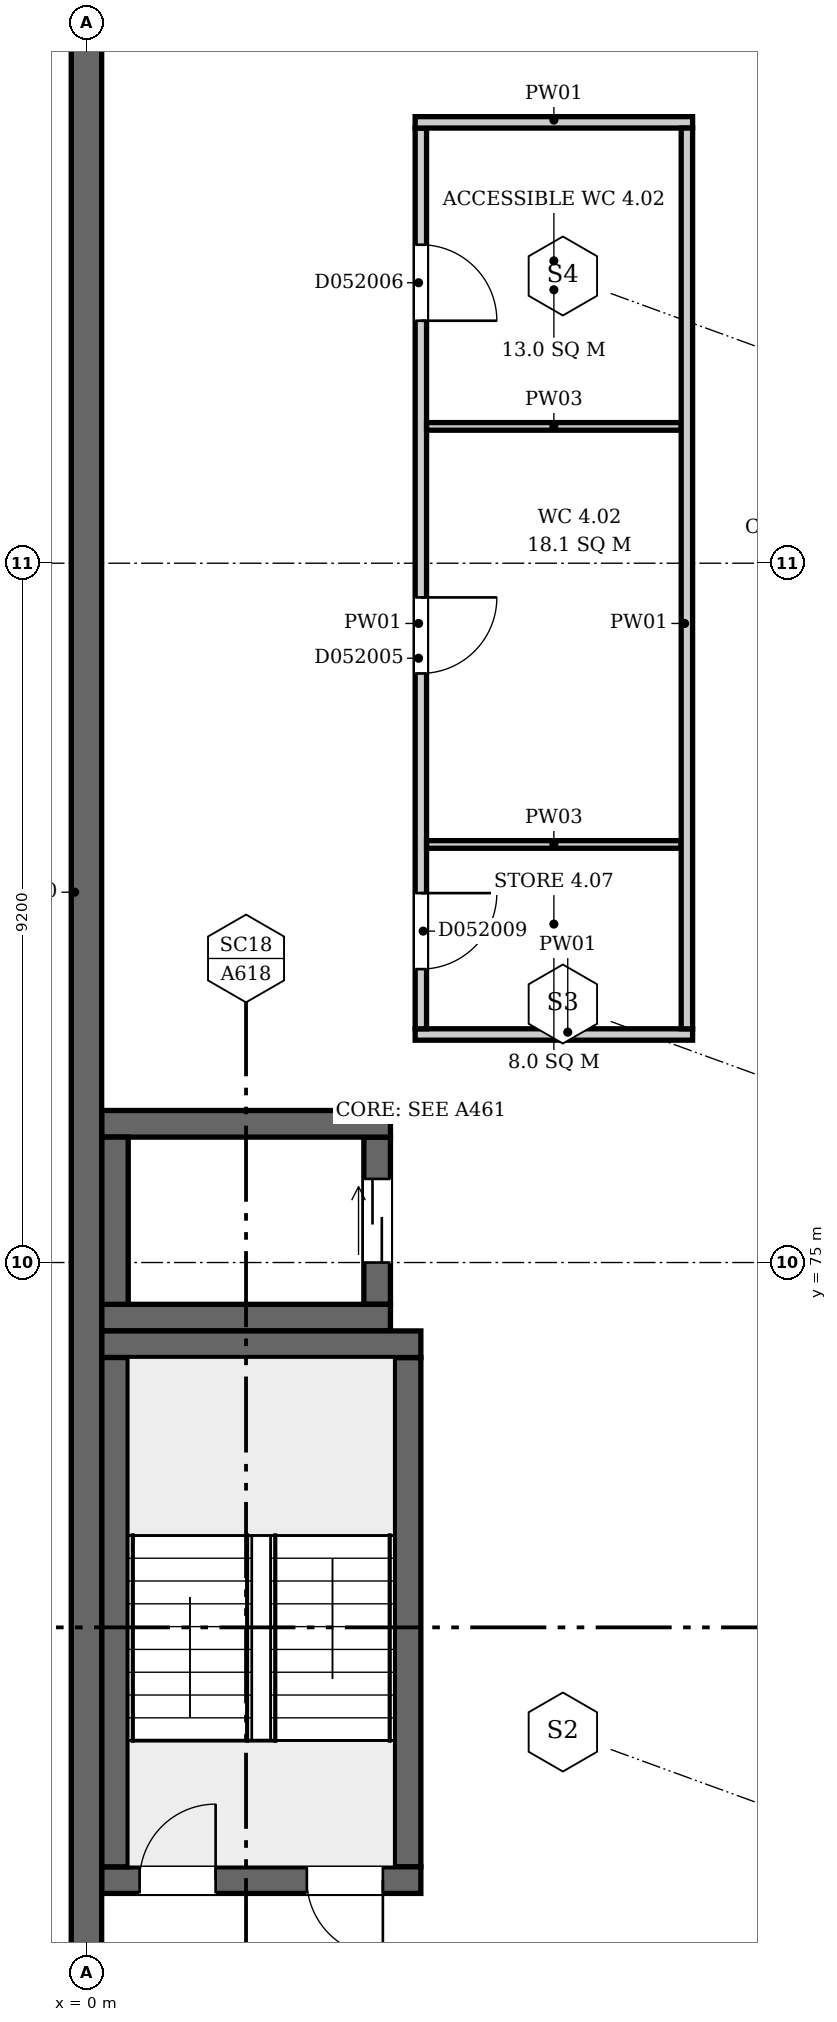
"""IFC4 building model, lengths in metres.
Left out: names, types, materials, properties, quantities, classifications, styles, units other than length and angle.
Written with IfcOpenShell. Run it as: python <this file> out.ifc"""

import sys

from ifc_helpers import new_model, si_unit, direction, frame, frame_2d, origin, place, context, subcontext, project, spatial, rectangle, extrude, element, fill, save


model = new_model("IFC4")
c1 = context("Model", 3, precision=1e-05, world=origin(), true_north=direction((0.0, 1.0)))
c2 = subcontext(c1, "Body", "Model", "MODEL_VIEW")
j1 = project(units=[si_unit("LENGTHUNIT", "METRE"), si_unit("PLANEANGLEUNIT", "RADIAN")], contexts=[c1])
p1 = place(None, origin())
s1 = spatial("IfcSite", under=j1, at=p1, CompositionType="ELEMENT")
p2 = place(p1, origin())
s2 = spatial("IfcBuilding", under=s1, at=p2, CompositionType="ELEMENT")
p3 = place(p2, frame((0.0, 0.0, 26.7)))
s3 = spatial("IfcBuildingStorey", under=s2, at=p3, CompositionType="ELEMENT", Elevation=26.7)
p4 = place(p3, frame((0.0, 46.72, 0.0), z_axis=(0.0, 0.0, 1.0), x_axis=(0.0, 1.0, 0.0)))
e1 = element("IfcWall", 1, at=p4, inside=s3, PredefinedType="SHEAR", context=c2, shape_type="SweptSolid", body=[
    extrude(rectangle(XDim=47.36, YDim=0.4, at=frame_2d((23.68, 0.0))), origin(), (0.0, 0.0, 1.0), 5.2),
])
p5 = place(p3, frame((0.2, 66.875, 0.0), z_axis=(0.0, 0.0, 1.0), x_axis=(1.0, 0.0, 0.0)))
e2 = element("IfcWall", 2, at=p5, inside=s3, PredefinedType="SHEAR", context=c2, shape_type="SweptSolid", body=[
    extrude(rectangle(XDim=4.2, YDim=0.35, at=frame_2d((2.1, 0.0))), origin(), (0.0, 0.0, 1.0), 5.2),
])
p6 = place(p5, frame((0.5, 0.0, 0.0)))
e3 = element("IfcOpeningElement", 3, at=p6, cuts=e2, PredefinedType="OPENING", context=c2, shape_type="SweptSolid", body=[
    extrude(rectangle(XDim=1.0, YDim=2.1, at=frame_2d((0.5, 1.05))), frame((0.0, 0.185, 0.0), z_axis=(0.0, -1.0, 0.0), x_axis=(1.0, 0.0, 0.0)), (0.0, 0.0, 1.0), 0.37),
])
p7 = place(p5, frame((2.7, 0.0, 0.0)))
e4 = element("IfcOpeningElement", 4, at=p7, cuts=e2, PredefinedType="OPENING", context=c2, shape_type="SweptSolid", body=[
    extrude(rectangle(XDim=1.0, YDim=2.1, at=frame_2d((0.5, 1.05))), frame((0.0, 0.185, 0.0), z_axis=(0.0, -1.0, 0.0), x_axis=(1.0, 0.0, 0.0)), (0.0, 0.0, 1.0), 0.37),
])
p8 = place(p3, frame((0.2, 73.925, 0.0), z_axis=(0.0, 0.0, 1.0), x_axis=(1.0, 0.0, 0.0)))
e5 = element("IfcWall", 5, at=p8, inside=s3, PredefinedType="SHEAR", context=c2, shape_type="SweptSolid", body=[
    extrude(rectangle(XDim=4.2, YDim=0.35, at=frame_2d((2.1, 0.0))), origin(), (0.0, 0.0, 1.0), 5.2),
])
for number, where, z_axis, x_axis in (
    (6, (0.375, 67.05, 0.0), (0.0, 0.0, 1.0), (0.0, 1.0, 0.0)),
    (7, (4.225, 67.05, 0.0), (0.0, 0.0, 1.0), (0.0, 1.0, 0.0)),
):
    element("IfcWall", number, at=place(p3, frame(where, z_axis=z_axis, x_axis=x_axis)), inside=s3, PredefinedType="SHEAR", context=c2, shape_type="SweptSolid", body=[
        extrude(rectangle(XDim=6.7, YDim=0.35, at=frame_2d((3.35, 0.0))), origin(), (0.0, 0.0, 1.0), 5.2),
    ])
for number, where, z_axis, x_axis in (
    (8, (0.2, 74.275, 0.0), (0.0, 0.0, 1.0), (1.0, 0.0, 0.0)),
    (9, (0.2, 76.825, 0.0), (0.0, 0.0, 1.0), (1.0, 0.0, 0.0)),
):
    element("IfcWall", number, at=place(p3, frame(where, z_axis=z_axis, x_axis=x_axis)), inside=s3, PredefinedType="SHEAR", context=c2, shape_type="SweptSolid", body=[
        extrude(rectangle(XDim=3.8, YDim=0.35, at=frame_2d((1.9, 0.0))), origin(), (0.0, 0.0, 1.0), 5.2),
    ])
p9 = place(p3, frame((0.375, 74.45, 0.0), z_axis=(0.0, 0.0, 1.0), x_axis=(0.0, 1.0, 0.0)))
e10 = element("IfcWall", 10, at=p9, inside=s3, PredefinedType="SHEAR", context=c2, shape_type="SweptSolid", body=[
    extrude(rectangle(XDim=2.2, YDim=0.35, at=frame_2d((1.1, 0.0))), origin(), (0.0, 0.0, 1.0), 5.2),
])
p10 = place(p3, frame((3.825, 74.45, 0.0), z_axis=(0.0, 0.0, 1.0), x_axis=(0.0, 1.0, 0.0)))
e11 = element("IfcWall", 11, at=p10, inside=s3, PredefinedType="SHEAR", context=c2, shape_type="SweptSolid", body=[
    extrude(rectangle(XDim=2.2, YDim=0.35, at=frame_2d((1.1, 0.0))), origin(), (0.0, 0.0, 1.0), 5.2),
])
p11 = place(p10, frame((0.55, 0.0, 0.0)))
e12 = element("IfcOpeningElement", 12, at=p11, cuts=e11, PredefinedType="OPENING", context=c2, shape_type="SweptSolid", body=[
    extrude(rectangle(XDim=1.1, YDim=2.1, at=frame_2d((0.55, 1.05))), frame((0.0, 0.185, 0.0), z_axis=(0.0, -1.0, 0.0), x_axis=(1.0, 0.0, 0.0)), (0.0, 0.0, 1.0), 0.37),
])
p12 = place(p3, frame((4.325, 78.0, 0.0), z_axis=(0.0, 0.0, 1.0), x_axis=(1.0, 0.0, 0.0)))
e13 = element("IfcWall", 13, at=p12, inside=s3, PredefinedType="PARTITIONING", context=c2, shape_type="SweptSolid", body=[
    extrude(rectangle(XDim=3.65, YDim=0.15, at=frame_2d((1.825, 0.0))), origin(), (0.0, 0.0, 1.0), 4.85),
])
p13 = place(p3, frame((4.4, 78.075, 0.0), z_axis=(0.0, 0.0, 1.0), x_axis=(0.0, 1.0, 0.0)))
e14 = element("IfcWall", 14, at=p13, inside=s3, PredefinedType="PARTITIONING", context=c2, shape_type="SweptSolid", body=[
    extrude(rectangle(XDim=11.85, YDim=0.15, at=frame_2d((5.925, 0.0))), origin(), (0.0, 0.0, 1.0), 4.85),
])
p14 = place(p13, frame((4.675, 0.0, 0.0)))
e15 = element("IfcOpeningElement", 15, at=p14, cuts=e14, PredefinedType="OPENING", context=c2, shape_type="SweptSolid", body=[
    extrude(rectangle(XDim=1.0, YDim=2.1, at=frame_2d((0.5, 1.05))), frame((0.0, 0.085, 0.0), z_axis=(0.0, -1.0, 0.0), x_axis=(1.0, 0.0, 0.0)), (0.0, 0.0, 1.0), 0.17),
])
p15 = place(p13, frame((9.315, 0.0, 0.0)))
e16 = element("IfcOpeningElement", 16, at=p15, cuts=e14, PredefinedType="OPENING", context=c2, shape_type="SweptSolid", body=[
    extrude(rectangle(XDim=1.0, YDim=2.1, at=frame_2d((0.5, 1.05))), frame((0.0, 0.085, 0.0), z_axis=(0.0, -1.0, 0.0), x_axis=(1.0, 0.0, 0.0)), (0.0, 0.0, 1.0), 0.17),
])
p16 = place(p13, frame((0.785, 0.0, 0.0)))
e17 = element("IfcOpeningElement", 17, at=p16, cuts=e14, PredefinedType="OPENING", context=c2, shape_type="SweptSolid", body=[
    extrude(rectangle(XDim=1.0, YDim=2.1, at=frame_2d((0.5, 1.05))), frame((0.0, 0.085, 0.0), z_axis=(0.0, -1.0, 0.0), x_axis=(1.0, 0.0, 0.0)), (0.0, 0.0, 1.0), 0.17),
])
p17 = place(p3, frame((4.325, 90.0, 0.0), z_axis=(0.0, 0.0, 1.0), x_axis=(1.0, 0.0, 0.0)))
e18 = element("IfcWall", 18, at=p17, inside=s3, PredefinedType="PARTITIONING", context=c2, shape_type="SweptSolid", body=[
    extrude(rectangle(XDim=3.65, YDim=0.15, at=frame_2d((1.825, 0.0))), origin(), (0.0, 0.0, 1.0), 4.85),
])
for number, where, z_axis, x_axis in (
    (19, (4.475, 80.5, 0.0), (0.0, 0.0, 1.0), (1.0, 0.0, 0.0)),
    (20, (4.475, 86.0, 0.0), (0.0, 0.0, 1.0), (1.0, 0.0, 0.0)),
):
    element("IfcWall", number, at=place(p3, frame(where, z_axis=z_axis, x_axis=x_axis)), inside=s3, PredefinedType="PARTITIONING", context=c2, shape_type="SweptSolid", body=[
        extrude(rectangle(XDim=3.35, YDim=0.1, at=frame_2d((1.675, 0.0))), origin(), (0.0, 0.0, 1.0), 4.85),
    ])
p18 = place(p3, frame((7.9, 78.075, 0.0), z_axis=(0.0, 0.0, 1.0), x_axis=(0.0, 1.0, 0.0)))
e21 = element("IfcWall", 21, at=p18, inside=s3, PredefinedType="PARTITIONING", context=c2, shape_type="SweptSolid", body=[
    extrude(rectangle(XDim=11.85, YDim=0.15, at=frame_2d((5.925, 0.0))), origin(), (0.0, 0.0, 1.0), 4.85),
])
p19 = place(p6, origin())
e22 = element("IfcDoor", 22, at=p19, inside=s3, OperationType="SINGLE_SWING_RIGHT", PredefinedType="DOOR", context=c2, shape_type="SweptSolid", body=[
    extrude(rectangle(XDim=1.0, YDim=2.1, at=frame_2d((0.5, 1.05))), frame((0.0, 0.025, 0.0), z_axis=(0.0, -1.0, 0.0), x_axis=(1.0, 0.0, 0.0)), (0.0, 0.0, 1.0), 0.05),
])
fill(e3, e22)
p20 = place(p7, origin())
e23 = element("IfcDoor", 23, at=p20, inside=s3, OperationType="SINGLE_SWING_LEFT", PredefinedType="DOOR", context=c2, shape_type="SweptSolid", body=[
    extrude(rectangle(XDim=1.0, YDim=2.1, at=frame_2d((0.5, 1.05))), frame((0.0, 0.025, 0.0), z_axis=(0.0, -1.0, 0.0), x_axis=(1.0, 0.0, 0.0)), (0.0, 0.0, 1.0), 0.05),
])
fill(e4, e23)
p21 = place(p11, origin())
e24 = element("IfcDoor", 24, at=p21, inside=s3, OperationType="DOUBLE_DOOR_SLIDING", PredefinedType="DOOR", context=c2, shape_type="SweptSolid", body=[
    extrude(rectangle(XDim=1.1, YDim=2.1, at=frame_2d((0.55, 1.05))), frame((0.0, 0.025, 0.0), z_axis=(0.0, -1.0, 0.0), x_axis=(1.0, 0.0, 0.0)), (0.0, 0.0, 1.0), 0.05),
])
fill(e12, e24)
p22 = place(p14, origin())
e25 = element("IfcDoor", 25, at=p22, inside=s3, OperationType="SINGLE_SWING_RIGHT", PredefinedType="DOOR", context=c2, shape_type="SweptSolid", body=[
    extrude(rectangle(XDim=1.0, YDim=2.1, at=frame_2d((0.5, 1.05))), frame((0.0, 0.025, 0.0), z_axis=(0.0, -1.0, 0.0), x_axis=(1.0, 0.0, 0.0)), (0.0, 0.0, 1.0), 0.05),
])
fill(e15, e25)
p23 = place(p15, origin())
e26 = element("IfcDoor", 26, at=p23, inside=s3, OperationType="SINGLE_SWING_LEFT", PredefinedType="DOOR", context=c2, shape_type="SweptSolid", body=[
    extrude(rectangle(XDim=1.0, YDim=2.1, at=frame_2d((0.5, 1.05))), frame((0.0, 0.025, 0.0), z_axis=(0.0, -1.0, 0.0), x_axis=(1.0, 0.0, 0.0)), (0.0, 0.0, 1.0), 0.05),
])
fill(e16, e26)
p24 = place(p16, origin())
e27 = element("IfcDoor", 27, at=p24, inside=s3, OperationType="SINGLE_SWING_RIGHT", PredefinedType="DOOR", context=c2, shape_type="SweptSolid", body=[
    extrude(rectangle(XDim=1.0, YDim=2.1, at=frame_2d((0.5, 1.05))), frame((0.0, 0.025, 0.0), z_axis=(0.0, -1.0, 0.0), x_axis=(1.0, 0.0, 0.0)), (0.0, 0.0, 1.0), 0.05),
])
fill(e17, e27)
save(model, sys.argv[1])
